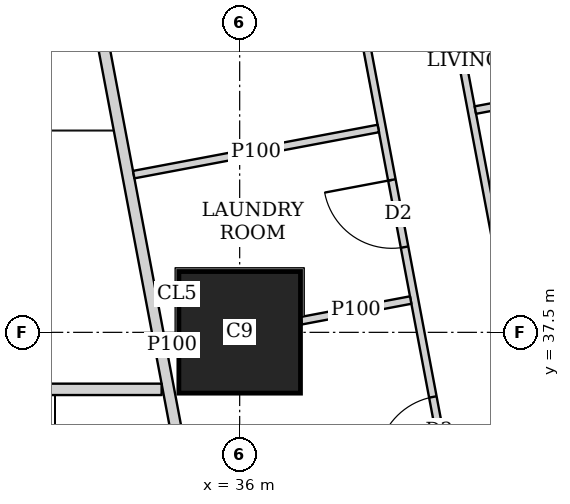
"""IFC4 building model, lengths in metres.
Left out: names, types, materials, properties, quantities, classifications, styles, units other than length and angle.
Written with IfcOpenShell. Run it as: python <this file> out.ifc"""

import sys

from ifc_helpers import new_model, si_unit, direction, frame, frame_2d, origin, origin_2d, place, context, subcontext, project, spatial, rectangle, extrude, element, fill, save


model = new_model("IFC4")
c1 = context("Model", 3, precision=1e-05, world=origin(), true_north=direction((0.0, 1.0)))
c2 = subcontext(c1, "Body", "Model", "MODEL_VIEW")
j1 = project(units=[si_unit("LENGTHUNIT", "METRE"), si_unit("PLANEANGLEUNIT", "RADIAN")], contexts=[c1])
p1 = place(None, origin())
s1 = spatial("IfcSite", under=j1, at=p1, CompositionType="ELEMENT")
p2 = place(p1, origin())
s2 = spatial("IfcBuilding", under=s1, at=p2, CompositionType="ELEMENT")
p3 = place(p2, frame((0.0, 0.0, 77.9)))
s3 = spatial("IfcBuildingStorey", under=s2, at=p3, CompositionType="ELEMENT", Elevation=77.9)
p4 = place(p3, frame((36.0, 37.5, 0.0), z_axis=(0.0, 0.0, 1.0), x_axis=(1.0, 0.0, 0.0)))
e1 = element("IfcColumn", 1, at=p4, inside=s3, PredefinedType="COLUMN", context=c2, shape_type="SweptSolid", body=[
    extrude(rectangle(XDim=1.6, YDim=1.6, at=origin_2d()), origin(), (0.0, 0.0, 1.0), 3.75),
])
p5 = place(p3, frame((29.801, 36.75, 0.0), z_axis=(0.0, 0.0, 1.0), x_axis=(1.0, 0.0, 0.0)))
e2 = element("IfcWall", 2, at=p5, inside=s3, PredefinedType="SOLIDWALL", context=c2, shape_type="SweptSolid", body=[
    extrude(rectangle(XDim=5.172, YDim=0.15, at=frame_2d((2.586, 0.0))), origin(), (0.0, 0.0, 1.0), 3.5),
])
p6 = place(p5, frame((2.645, 0.0, 0.0)))
e3 = element("IfcOpeningElement", 3, at=p6, cuts=e2, PredefinedType="OPENING", context=c2, shape_type="SweptSolid", body=[
    extrude(rectangle(XDim=1.0, YDim=2.1, at=frame_2d((0.5, 1.05))), frame((0.0, 0.085, 0.0), z_axis=(0.0, -1.0, 0.0), x_axis=(1.0, 0.0, 0.0)), (0.0, 0.0, 1.0), 0.17),
])
p7 = place(p3, frame((33.382, 45.65, 0.0), z_axis=(0.0, 0.0, 1.0), x_axis=(0.185593544777, -0.982626600565, 0.0)))
e4 = element("IfcWall", 4, at=p7, inside=s3, PredefinedType="SOLIDWALL", context=c2, shape_type="SweptSolid", body=[
    extrude(rectangle(XDim=47.118, YDim=0.15, at=frame_2d((23.559, 0.0))), origin(), (0.0, 0.0, 1.0), 2.2),
])
p8 = place(p7, frame((19.054, 0.0, 0.0)))
e5 = element("IfcOpeningElement", 5, at=p8, cuts=e4, PredefinedType="OPENING", context=c2, shape_type="SweptSolid", body=[
    extrude(rectangle(XDim=1.0, YDim=2.1, at=frame_2d((0.5, 1.05))), frame((0.0, 0.085, 0.0), z_axis=(0.0, -1.0, 0.0), x_axis=(1.0, 0.0, 0.0)), (0.0, 0.0, 1.0), 0.17),
])
p9 = place(p7, frame((22.87, 0.0, 0.0)))
e6 = element("IfcOpeningElement", 6, at=p9, cuts=e4, PredefinedType="OPENING", context=c2, shape_type="SweptSolid", body=[
    extrude(rectangle(XDim=1.0, YDim=2.1, at=frame_2d((0.5, 1.05))), frame((0.0, 0.085, 0.0), z_axis=(0.0, -1.0, 0.0), x_axis=(1.0, 0.0, 0.0)), (0.0, 0.0, 1.0), 0.17),
])
p10 = place(p7, frame((33.833, 0.0, 0.0)))
e7 = element("IfcOpeningElement", 7, at=p10, cuts=e4, PredefinedType="OPENING", context=c2, shape_type="SweptSolid", body=[
    extrude(rectangle(XDim=1.0, YDim=2.1, at=frame_2d((0.5, 1.05))), frame((0.0, 0.085, 0.0), z_axis=(0.0, -1.0, 0.0), x_axis=(1.0, 0.0, 0.0)), (0.0, 0.0, 1.0), 0.17),
])
p11 = place(p3, frame((38.862, 41.42, 0.0), z_axis=(0.0, 0.0, 1.0), x_axis=(0.185529020159, -0.982638785454, 0.0)))
e8 = element("IfcWall", 8, at=p11, inside=s3, PredefinedType="PARTITIONING", context=c2, shape_type="SweptSolid", body=[
    extrude(rectangle(XDim=12.262, YDim=0.1, at=frame_2d((6.131, 0.0))), origin(), (0.0, 0.0, 1.0), 2.5),
])
p12 = place(p11, frame((11.212, 0.0, 0.0)))
e9 = element("IfcOpeningElement", 9, at=p12, cuts=e8, PredefinedType="OPENING", context=c2, shape_type="SweptSolid", body=[
    extrude(rectangle(XDim=0.9, YDim=2.1, at=frame_2d((0.45, 1.05))), frame((0.0, 0.06, 0.0), z_axis=(0.0, -1.0, 0.0), x_axis=(1.0, 0.0, 0.0)), (0.0, 0.0, 1.0), 0.12),
])
p13 = place(p11, frame((7.555, 0.0, 0.0)))
e10 = element("IfcOpeningElement", 10, at=p13, cuts=e8, PredefinedType="OPENING", context=c2, shape_type="SweptSolid", body=[
    extrude(rectangle(XDim=0.9, YDim=2.1, at=frame_2d((0.45, 1.05))), frame((0.0, 0.06, 0.0), z_axis=(0.0, -1.0, 0.0), x_axis=(1.0, 0.0, 0.0)), (0.0, 0.0, 1.0), 0.12),
])
p14 = place(p11, frame((3.579, 0.0, 0.0)))
e11 = element("IfcOpeningElement", 11, at=p14, cuts=e8, PredefinedType="OPENING", context=c2, shape_type="SweptSolid", body=[
    extrude(rectangle(XDim=0.9, YDim=2.1, at=frame_2d((0.45, 1.05))), frame((0.0, 0.06, 0.0), z_axis=(0.0, -1.0, 0.0), x_axis=(1.0, 0.0, 0.0)), (0.0, 0.0, 1.0), 0.12),
])
p15 = place(p3, frame((37.473, 42.309, 0.0), z_axis=(0.0, 0.0, 1.0), x_axis=(0.185570636839, -0.982630927024, 0.0)))
e12 = element("IfcWall", 12, at=p15, inside=s3, PredefinedType="PARTITIONING", context=c2, shape_type="SweptSolid", body=[
    extrude(rectangle(XDim=13.553, YDim=0.1, at=frame_2d((6.777, 0.0))), origin(), (0.0, 0.0, 1.0), 2.5),
])
p16 = place(p15, frame((12.049, 0.0, 0.0)))
e13 = element("IfcOpeningElement", 13, at=p16, cuts=e12, PredefinedType="OPENING", context=c2, shape_type="SweptSolid", body=[
    extrude(rectangle(XDim=0.9, YDim=2.1, at=frame_2d((0.45, 1.05))), frame((0.0, 0.06, 0.0), z_axis=(0.0, -1.0, 0.0), x_axis=(1.0, 0.0, 0.0)), (0.0, 0.0, 1.0), 0.12),
])
p17 = place(p15, frame((8.427, 0.0, 0.0)))
e14 = element("IfcOpeningElement", 14, at=p17, cuts=e12, PredefinedType="OPENING", context=c2, shape_type="SweptSolid", body=[
    extrude(rectangle(XDim=0.9, YDim=2.1, at=frame_2d((0.45, 1.05))), frame((0.0, 0.06, 0.0), z_axis=(0.0, -1.0, 0.0), x_axis=(1.0, 0.0, 0.0)), (0.0, 0.0, 1.0), 0.12),
])
p18 = place(p15, frame((2.853, 0.0, 0.0)))
e15 = element("IfcOpeningElement", 15, at=p18, cuts=e12, PredefinedType="OPENING", context=c2, shape_type="SweptSolid", body=[
    extrude(rectangle(XDim=0.9, YDim=2.1, at=frame_2d((0.45, 1.05))), frame((0.0, 0.06, 0.0), z_axis=(0.0, -1.0, 0.0), x_axis=(1.0, 0.0, 0.0)), (0.0, 0.0, 1.0), 0.12),
])
p19 = place(p15, frame((10.14, 0.0, 0.0)))
e16 = element("IfcOpeningElement", 16, at=p19, cuts=e12, PredefinedType="OPENING", context=c2, shape_type="SweptSolid", body=[
    extrude(rectangle(XDim=0.9, YDim=2.1, at=frame_2d((0.45, 1.05))), frame((0.0, 0.06, 0.0), z_axis=(0.0, -1.0, 0.0), x_axis=(1.0, 0.0, 0.0)), (0.0, 0.0, 1.0), 0.12),
])
p20 = place(p15, frame((5.759, 0.0, 0.0)))
e17 = element("IfcOpeningElement", 17, at=p20, cuts=e12, PredefinedType="OPENING", context=c2, shape_type="SweptSolid", body=[
    extrude(rectangle(XDim=0.9, YDim=2.1, at=frame_2d((0.45, 1.05))), frame((0.0, 0.06, 0.0), z_axis=(0.0, -1.0, 0.0), x_axis=(1.0, 0.0, 0.0)), (0.0, 0.0, 1.0), 0.12),
])
p21 = place(p3, frame((43.277, 41.212, 0.0), z_axis=(0.0, 0.0, 1.0), x_axis=(-0.982665405803, -0.185387972203, 0.0)))
e18 = element("IfcWall", 18, at=p21, inside=s3, PredefinedType="PARTITIONING", context=c2, shape_type="SweptSolid", body=[
    extrude(rectangle(XDim=4.25, YDim=0.1, at=frame_2d((2.125, 0.0))), origin(), (0.0, 0.0, 1.0), 2.05),
])
p22 = place(p3, frame((37.824, 40.182, 0.0), z_axis=(0.0, 0.0, 1.0), x_axis=(-0.982674977865, -0.185337227447, 0.0)))
e19 = element("IfcWall", 19, at=p22, inside=s3, PredefinedType="PARTITIONING", context=c2, shape_type="SweptSolid", body=[
    extrude(rectangle(XDim=3.275, YDim=0.1, at=frame_2d((1.637, 0.0))), origin(), (0.0, 0.0, 1.0), 3.5),
])
p23 = place(p3, frame((38.25, 37.925, 0.0), z_axis=(0.0, 0.0, 1.0), x_axis=(-0.982626127294, -0.185596050493, 0.0)))
e20 = element("IfcWall", 20, at=p23, inside=s3, PredefinedType="PARTITIONING", context=c2, shape_type="SweptSolid", body=[
    extrude(rectangle(XDim=1.465, YDim=0.1, at=frame_2d((0.733, 0.0))), origin(), (0.0, 0.0, 1.0), 3.5),
])
p24 = place(p3, frame((35.19, 37.347, 0.0), z_axis=(0.0, 0.0, 1.0), x_axis=(-0.982404955251, -0.186763229514, 0.0)))
e21 = element("IfcWall", 21, at=p24, inside=s3, PredefinedType="PARTITIONING", context=c2, shape_type="SweptSolid", body=[
    extrude(rectangle(XDim=0.161, YDim=0.1, at=frame_2d((0.081, 0.0))), origin(), (0.0, 0.0, 1.0), 3.5),
])
p25 = place(p18, origin())
e22 = element("IfcDoor", 22, at=p25, inside=s3, OperationType="SINGLE_SWING_RIGHT", PredefinedType="DOOR", context=c2, shape_type="SweptSolid", body=[
    extrude(rectangle(XDim=0.9, YDim=2.1, at=frame_2d((0.45, 1.05))), frame((0.0, 0.025, 0.0), z_axis=(0.0, -1.0, 0.0), x_axis=(1.0, 0.0, 0.0)), (0.0, 0.0, 1.0), 0.05),
])
fill(e15, e22)
p26 = place(p20, origin())
e23 = element("IfcDoor", 23, at=p26, inside=s3, OperationType="SINGLE_SWING_LEFT", PredefinedType="DOOR", context=c2, shape_type="SweptSolid", body=[
    extrude(rectangle(XDim=0.9, YDim=2.1, at=frame_2d((0.45, 1.05))), frame((0.0, 0.025, 0.0), z_axis=(0.0, -1.0, 0.0), x_axis=(1.0, 0.0, 0.0)), (0.0, 0.0, 1.0), 0.05),
])
fill(e17, e23)
save(model, sys.argv[1])
